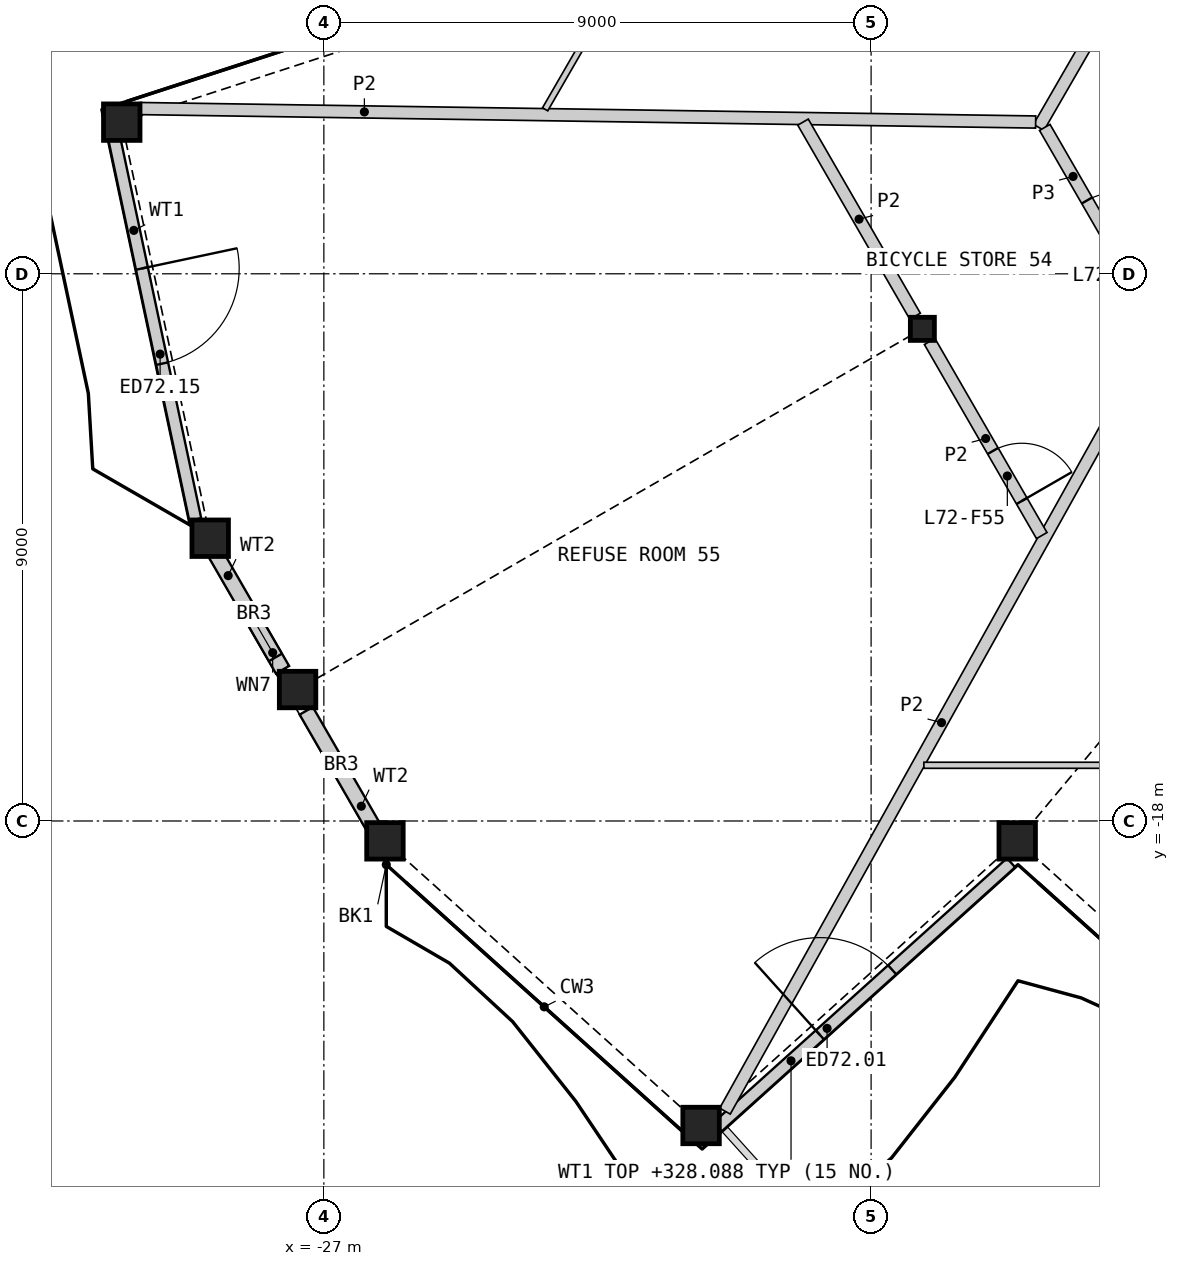
"""IFC4 building model, lengths in metres.
Left out: names, types, materials, properties, quantities, classifications, styles, units other than length and angle.
Written with IfcOpenShell. Run it as: python <this file> out.ifc"""

import sys

from ifc_helpers import new_model, si_unit, direction, frame, frame_2d, origin, origin_2d, place, context, subcontext, project, spatial, rectangle, hollow_rectangle, i_section, extrude, element, fill, save


model = new_model("IFC4")
c1 = context("Model", 3, precision=1e-05, world=origin(), true_north=direction((0.0, 1.0)))
c2 = subcontext(c1, "Body", "Model", "MODEL_VIEW")
j1 = project(units=[si_unit("LENGTHUNIT", "METRE"), si_unit("PLANEANGLEUNIT", "RADIAN")], contexts=[c1])
p1 = place(None, origin())
s1 = spatial("IfcSite", under=j1, at=p1, CompositionType="ELEMENT")
p2 = place(p1, origin())
s2 = spatial("IfcBuilding", under=s1, at=p2, CompositionType="ELEMENT")
p3 = place(p2, frame((0.0, 0.0, 325.6)))
s3 = spatial("IfcBuildingStorey", under=s2, at=p3, CompositionType="ELEMENT", Elevation=325.6)
for number, where, z_axis, x_axis in (
    (1, (-25.995, -18.327, 0.0), (0.0, 0.0, 1.0), (1.0, 0.0, 0.0)),
    (2, (-20.796, -23.008, 0.0), (0.0, 0.0, 1.0), (1.0, 0.0, 0.0)),
    (3, (-15.597, -18.327, 0.0), (0.0, 0.0, 1.0), (1.0, 0.0, 0.0)),
    (4, (-30.324, -6.506, 0.0), (0.0, 0.0, 1.0), (1.0, 0.0, 0.0)),
    (5, (-28.869, -13.349, 0.0), (0.0, 0.0, 1.0), (1.0, 0.0, 0.0)),
    (6, (-27.432, -15.838, 0.0), (0.0, 0.0, 1.0), (1.0, 0.0, 0.0)),
):
    element("IfcColumn", number, at=place(p3, frame(where, z_axis=z_axis, x_axis=x_axis)), inside=s3, PredefinedType="COLUMN", context=c2, shape_type="SweptSolid", body=[
        extrude(hollow_rectangle(XDim=0.6, YDim=0.6, WallThickness=0.04, at=origin_2d()), origin(), (0.0, 0.0, 1.0), 3.4),
    ])
p4 = place(p3, frame((-17.157, -9.906, 0.0), z_axis=(0.0, 0.0, 1.0), x_axis=(1.0, 0.0, 0.0)))
e7 = element("IfcColumn", 7, at=p4, inside=s3, PredefinedType="COLUMN", context=c2, shape_type="SweptSolid", body=[
    extrude(i_section(OverallWidth=0.396, OverallDepth=0.381, WebThickness=0.019, FlangeThickness=0.03, at=origin_2d()), origin(), (0.0, 0.0, 1.0), 3.4),
])
p5 = place(p3, frame((-20.523, -23.031, 0.0), z_axis=(0.0, 0.0, 1.0), x_axis=(0.743138937876, 0.669137145145, 0.0)))
e8 = element("IfcWall", 8, at=p5, inside=s3, PredefinedType="SOLIDWALL", context=c2, shape_type="SweptSolid", body=[
    extrude(rectangle(XDim=6.493, YDim=0.2, at=frame_2d((3.246, 0.0))), origin(), (0.0, 0.0, 1.0), 2.488),
])
p6 = place(p5, frame((2.261, 0.0, 0.0)))
e9 = element("IfcOpeningElement", 9, at=p6, cuts=e8, PredefinedType="OPENING", context=c2, shape_type="SweptSolid", body=[
    extrude(rectangle(XDim=1.6, YDim=2.25, at=frame_2d((0.8, 1.125))), frame((0.0, 0.11, 0.0), z_axis=(0.0, -1.0, 0.0), x_axis=(1.0, 0.0, 0.0)), (0.0, 0.0, 1.0), 0.22),
])
p7 = place(p3, frame((-30.462, -6.701, 0.0), z_axis=(0.0, 0.0, 1.0), x_axis=(0.207915966693, -0.978146691859, 0.0)))
e10 = element("IfcWall", 10, at=p7, inside=s3, PredefinedType="SOLIDWALL", context=c2, shape_type="SweptSolid", body=[
    extrude(rectangle(XDim=6.482, YDim=0.2, at=frame_2d((3.241, 0.0))), origin(), (0.0, 0.0, 1.0), 2.488),
])
p8 = place(p7, frame((2.261, 0.0, 0.0)))
e11 = element("IfcOpeningElement", 11, at=p8, cuts=e10, PredefinedType="OPENING", context=c2, shape_type="SweptSolid", body=[
    extrude(rectangle(XDim=1.6, YDim=2.25, at=frame_2d((0.8, 1.125))), frame((0.0, 0.11, 0.0), z_axis=(0.0, -1.0, 0.0), x_axis=(1.0, 0.0, 0.0)), (0.0, 0.0, 1.0), 0.22),
])
p9 = place(p3, frame((-28.872, -13.448, 0.0), z_axis=(0.0, 0.0, 1.0), x_axis=(0.499982446489, -0.866035538072, 0.0)))
e12 = element("IfcWall", 12, at=p9, inside=s3, PredefinedType="SOLIDWALL", context=c2, shape_type="SweptSolid", body=[
    extrude(rectangle(XDim=2.384, YDim=0.25, at=frame_2d((1.192, 0.0))), origin(), (0.0, 0.0, 1.0), 2.488),
])
p10 = place(p9, frame((1.25, 0.0, 1.6)))
e13 = element("IfcOpeningElement", 13, at=p10, cuts=e12, PredefinedType="OPENING", context=c2, shape_type="SweptSolid", body=[
    extrude(rectangle(XDim=0.9, YDim=0.6, at=frame_2d((0.45, 0.3))), frame((0.0, 0.135, 0.0), z_axis=(0.0, -1.0, 0.0), x_axis=(1.0, 0.0, 0.0)), (0.0, 0.0, 1.0), 0.27),
])
p11 = place(p3, frame((-27.29, -16.188, 0.0), z_axis=(0.0, 0.0, 1.0), x_axis=(0.50001992892, -0.866013897511, 0.0)))
e14 = element("IfcWall", 14, at=p11, inside=s3, PredefinedType="SOLIDWALL", context=c2, shape_type="SweptSolid", body=[
    extrude(rectangle(XDim=2.416, YDim=0.25, at=frame_2d((1.208, 0.0))), origin(), (0.0, 0.0, 1.0), 2.488),
])
p12 = place(p3, frame((-15.244, -6.592, 0.0), z_axis=(0.0, 0.0, 1.0), x_axis=(0.49999094734, 0.866030630277, 0.0)))
e15 = element("IfcWall", 15, at=p12, inside=s3, PredefinedType="PARTITIONING", context=c2, shape_type="SweptSolid", body=[
    extrude(rectangle(XDim=4.513, YDim=0.2, at=frame_2d((2.256, 0.0))), origin(), (0.0, 0.0, 1.0), 3.1),
])
p13 = place(p3, frame((-15.144, -6.592, 0.0), z_axis=(0.0, 0.0, 1.0), x_axis=(0.499958791762, -0.866049194065, 0.0)))
e16 = element("IfcWall", 16, at=p13, inside=s3, PredefinedType="PARTITIONING", context=c2, shape_type="SweptSolid", body=[
    extrude(rectangle(XDim=3.726, YDim=0.2, at=frame_2d((1.863, 0.0))), origin(), (0.0, 0.0, 1.0), 3.1),
])
p14 = place(p13, frame((1.388, 0.0, 0.0)))
e17 = element("IfcOpeningElement", 17, at=p14, cuts=e16, PredefinedType="OPENING", context=c2, shape_type="SweptSolid", body=[
    extrude(rectangle(XDim=0.95, YDim=2.1, at=frame_2d((0.475, 1.05))), frame((0.0, 0.11, 0.0), z_axis=(0.0, -1.0, 0.0), x_axis=(1.0, 0.0, 0.0)), (0.0, 0.0, 1.0), 0.22),
])
p15 = place(p3, frame((-20.404, -22.772, 0.0), z_axis=(0.0, 0.0, 1.0), x_axis=(0.486917529285, 0.873447949036, 0.0)))
e18 = element("IfcWall", 18, at=p15, inside=s3, PredefinedType="PARTITIONING", context=c2, shape_type="SweptSolid", body=[
    extrude(rectangle(XDim=14.631, YDim=0.2, at=frame_2d((7.315, 0.0))), origin(), (0.0, 0.0, 1.0), 2.33),
])
p16 = place(p3, frame((-30.014, -6.282, 0.0), z_axis=(0.0, 0.0, 1.0), x_axis=(0.99988686643, -0.015041753265, 0.0)))
e19 = element("IfcWall", 19, at=p16, inside=s3, PredefinedType="PARTITIONING", context=c2, shape_type="SweptSolid", body=[
    extrude(rectangle(XDim=14.721, YDim=0.2, at=frame_2d((7.361, 0.0))), origin(), (0.0, 0.0, 1.0), 2.33),
])
p17 = place(p3, frame((-17.037, -10.113, 0.0), z_axis=(0.0, 0.0, 1.0), x_axis=(0.50002820729, -0.866009117685, 0.0)))
e20 = element("IfcWall", 20, at=p17, inside=s3, PredefinedType="PARTITIONING", context=c2, shape_type="SweptSolid", body=[
    extrude(rectangle(XDim=3.686, YDim=0.2, at=frame_2d((1.843, 0.0))), origin(), (0.0, 0.0, 1.0), 2.33),
])
p18 = place(p17, frame((2.08, 0.0, 0.0)))
e21 = element("IfcOpeningElement", 21, at=p18, cuts=e20, PredefinedType="OPENING", context=c2, shape_type="SweptSolid", body=[
    extrude(rectangle(XDim=0.95, YDim=2.1, at=frame_2d((0.475, 1.05))), frame((0.0, 0.11, 0.0), z_axis=(0.0, -1.0, 0.0), x_axis=(1.0, 0.0, 0.0)), (0.0, 0.0, 1.0), 0.22),
])
p19 = place(p3, frame((-19.12, -6.506, 0.0), z_axis=(0.0, 0.0, 1.0), x_axis=(0.499978535015, -0.866037796245, 0.0)))
e22 = element("IfcWall", 22, at=p19, inside=s3, PredefinedType="PARTITIONING", context=c2, shape_type="SweptSolid", body=[
    extrude(rectangle(XDim=3.686, YDim=0.2, at=frame_2d((1.843, 0.0))), origin(), (0.0, 0.0, 1.0), 2.33),
])
p20 = place(p3, frame((-23.361, -6.295, 0.0), z_axis=(0.0, 0.0, 1.0), x_axis=(0.499987686533, 0.866032512851, 0.0)))
e23 = element("IfcWall", 23, at=p20, inside=s3, PredefinedType="PARTITIONING", context=c2, shape_type="SweptSolid", body=[
    extrude(rectangle(XDim=6.693, YDim=0.1, at=frame_2d((3.347, 0.0))), origin(), (0.0, 0.0, 1.0), 2.33),
])
p21 = place(p20, frame((3.275, 0.0, 0.0)))
e24 = element("IfcOpeningElement", 24, at=p21, cuts=e23, PredefinedType="OPENING", context=c2, shape_type="SweptSolid", body=[
    extrude(rectangle(XDim=0.95, YDim=2.1, at=frame_2d((0.475, 1.05))), frame((0.0, 0.06, 0.0), z_axis=(0.0, -1.0, 0.0), x_axis=(1.0, 0.0, 0.0)), (0.0, 0.0, 1.0), 0.12),
])
p22 = place(p3, frame((-17.132, -17.084, 0.0), z_axis=(0.0, 0.0, 1.0), x_axis=(1.0, 0.0, 0.0)))
e25 = element("IfcWall", 25, at=p22, inside=s3, PredefinedType="PARTITIONING", context=c2, shape_type="SweptSolid", body=[
    extrude(rectangle(XDim=6.693, YDim=0.1, at=frame_2d((3.346, 0.0))), origin(), (0.0, 0.0, 1.0), 2.33),
])
p23 = place(p22, frame((4.989, 0.0, 0.0)))
e26 = element("IfcOpeningElement", 26, at=p23, cuts=e25, PredefinedType="OPENING", context=c2, shape_type="SweptSolid", body=[
    extrude(rectangle(XDim=0.95, YDim=2.1, at=frame_2d((0.475, 1.05))), frame((0.0, 0.06, 0.0), z_axis=(0.0, -1.0, 0.0), x_axis=(1.0, 0.0, 0.0)), (0.0, 0.0, 1.0), 0.12),
])
p24 = place(p6, origin())
e27 = element("IfcDoor", 27, at=p24, inside=s3, OperationType="DOUBLE_DOOR_SINGLE_SWING", PredefinedType="DOOR", context=c2, shape_type="SweptSolid", body=[
    extrude(rectangle(XDim=1.6, YDim=2.25, at=frame_2d((0.8, 1.125))), frame((0.0, 0.025, 0.0), z_axis=(0.0, -1.0, 0.0), x_axis=(1.0, 0.0, 0.0)), (0.0, 0.0, 1.0), 0.05),
])
fill(e9, e27)
p25 = place(p8, origin())
e28 = element("IfcDoor", 28, at=p25, inside=s3, OperationType="DOUBLE_DOOR_SINGLE_SWING", PredefinedType="DOOR", context=c2, shape_type="SweptSolid", body=[
    extrude(rectangle(XDim=1.6, YDim=2.25, at=frame_2d((0.8, 1.125))), frame((0.0, 0.025, 0.0), z_axis=(0.0, -1.0, 0.0), x_axis=(1.0, 0.0, 0.0)), (0.0, 0.0, 1.0), 0.05),
])
fill(e11, e28)
p26 = place(p10, origin())
e29 = element("IfcWindow", 29, at=p26, inside=s3, PartitioningType="SINGLE_PANEL", PredefinedType="WINDOW", context=c2, shape_type="SweptSolid", body=[
    extrude(rectangle(XDim=0.9, YDim=0.6, at=frame_2d((0.45, 0.3))), frame((0.0, 0.03, 0.0), z_axis=(0.0, -1.0, 0.0), x_axis=(1.0, 0.0, 0.0)), (0.0, 0.0, 1.0), 0.06),
])
fill(e13, e29)
p27 = place(p14, origin())
e30 = element("IfcDoor", 30, at=p27, inside=s3, OperationType="SINGLE_SWING_RIGHT", PredefinedType="DOOR", context=c2, shape_type="SweptSolid", body=[
    extrude(rectangle(XDim=0.95, YDim=2.1, at=frame_2d((0.475, 1.05))), frame((0.0, 0.025, 0.0), z_axis=(0.0, -1.0, 0.0), x_axis=(1.0, 0.0, 0.0)), (0.0, 0.0, 1.0), 0.05),
])
fill(e17, e30)
p28 = place(p18, origin())
e31 = element("IfcDoor", 31, at=p28, inside=s3, OperationType="SINGLE_SWING_RIGHT", PredefinedType="DOOR", context=c2, shape_type="SweptSolid", body=[
    extrude(rectangle(XDim=0.95, YDim=2.1, at=frame_2d((0.475, 1.05))), frame((0.0, 0.025, 0.0), z_axis=(0.0, -1.0, 0.0), x_axis=(1.0, 0.0, 0.0)), (0.0, 0.0, 1.0), 0.05),
])
fill(e21, e31)
save(model, sys.argv[1])
